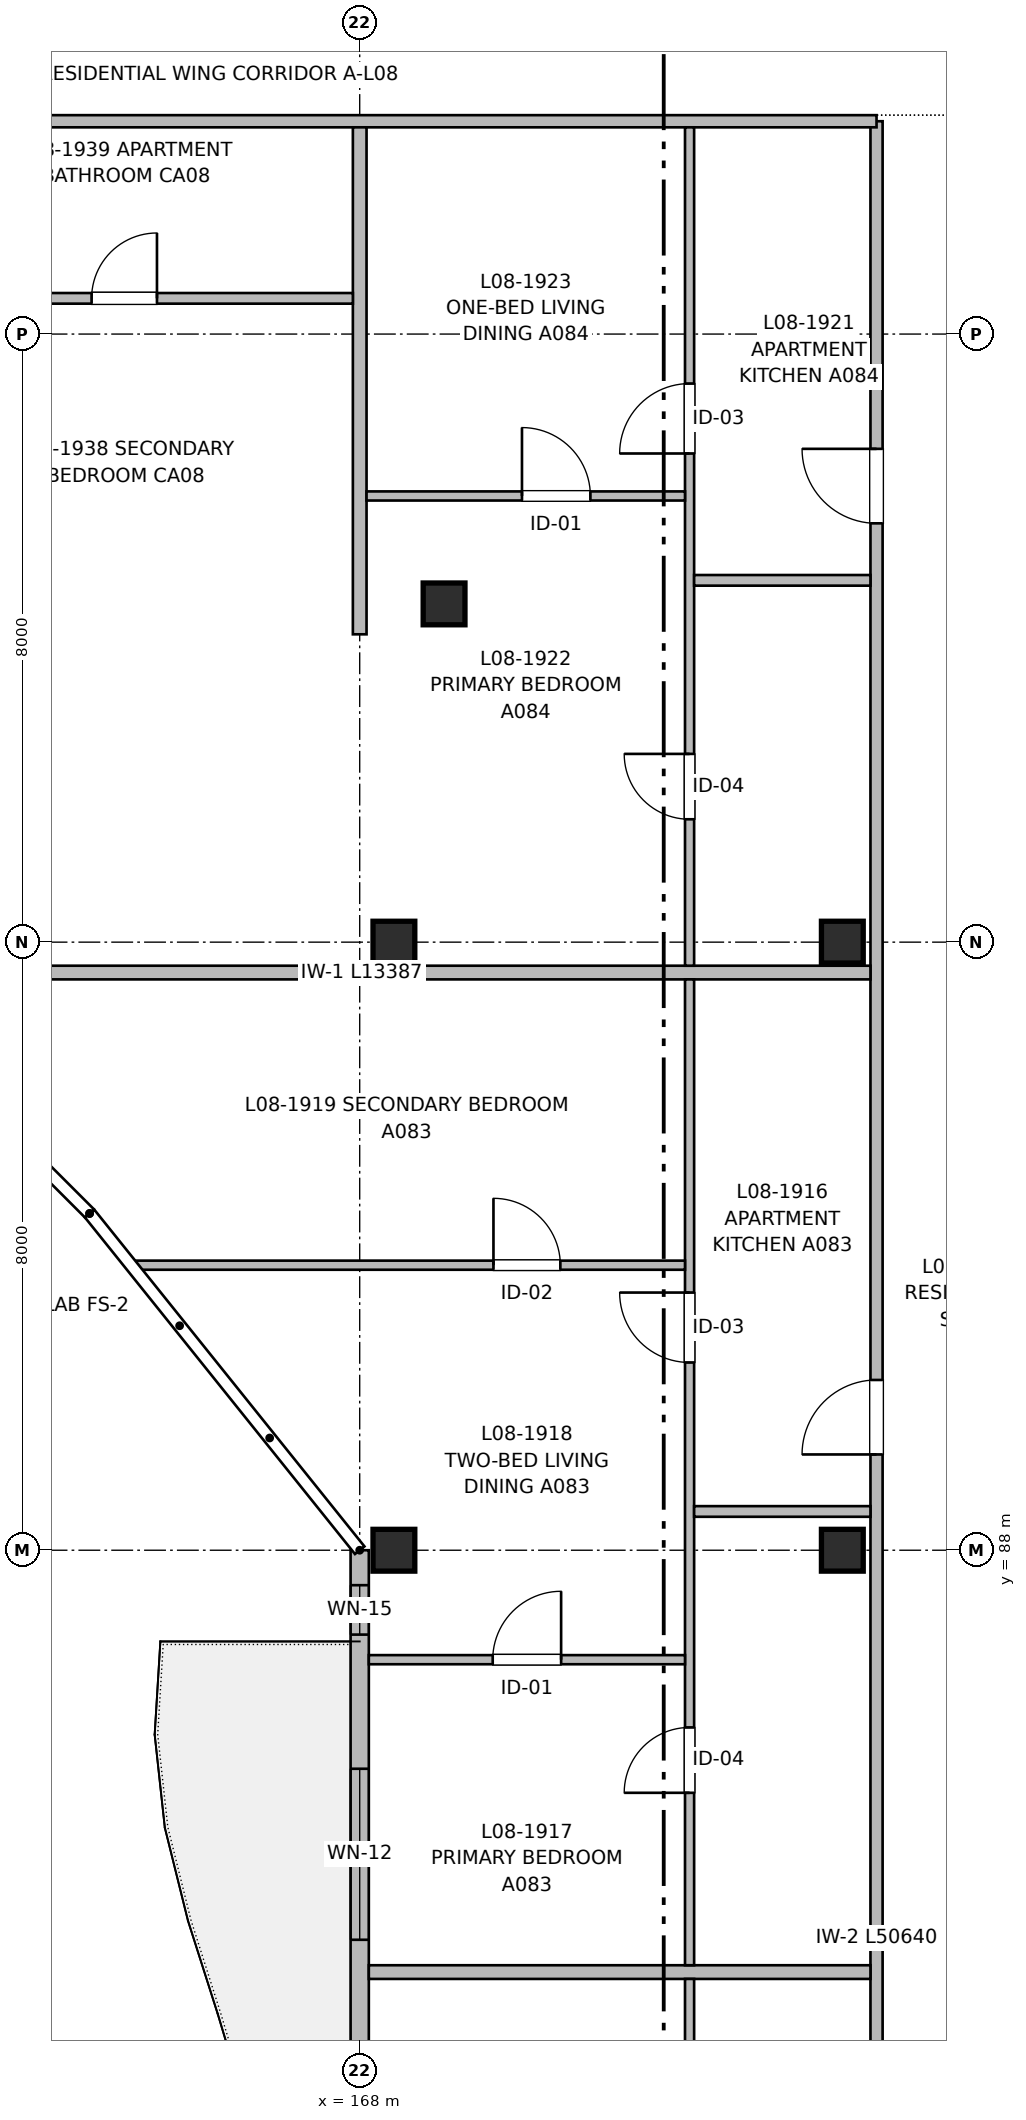
"""IFC4 building model, lengths in metres.
Left out: names, types, materials, properties, quantities, classifications, styles, units other than length and angle.
Written with IfcOpenShell. Run it as: python <this file> out.ifc"""

import sys

from ifc_helpers import new_model, si_unit, direction, frame, frame_2d, origin, origin_2d, place, context, subcontext, project, spatial, rectangle, extrude, element, fill, save


model = new_model("IFC4")
c1 = context("Model", 3, precision=1e-05, world=origin(), true_north=direction((0.0, 1.0)))
c2 = subcontext(c1, "Body", "Model", "MODEL_VIEW")
j1 = project(units=[si_unit("LENGTHUNIT", "METRE"), si_unit("PLANEANGLEUNIT", "RADIAN")], contexts=[c1])
p1 = place(None, origin())
s1 = spatial("IfcSite", under=j1, at=p1, CompositionType="ELEMENT")
p2 = place(p1, origin())
s2 = spatial("IfcBuilding", under=s1, at=p2, CompositionType="ELEMENT")
p3 = place(p2, frame((0.0, 0.0, 26.56)))
s3 = spatial("IfcBuildingStorey", under=s2, at=p3, CompositionType="ELEMENT", Elevation=26.56)
for number, where, z_axis, x_axis in (
    (1, (168.45, 88.0, 0.0), (0.0, 0.0, 1.0), (1.0, 0.0, 0.0)),
    (2, (168.45, 96.0, 0.0), (0.0, 0.0, 1.0), (1.0, 0.0, 0.0)),
    (3, (169.11, 100.45, 0.0), (0.0, 0.0, 1.0), (1.0, 0.0, 0.0)),
    (4, (174.35, 88.0, 0.0), (0.0, 0.0, 1.0), (1.0, 0.0, 0.0)),
    (5, (174.35, 96.0, 0.0), (0.0, 0.0, 1.0), (1.0, 0.0, 0.0)),
):
    element("IfcColumn", number, at=place(p3, frame(where, z_axis=z_axis, x_axis=x_axis)), inside=s3, PredefinedType="COLUMN", context=c2, shape_type="SweptSolid", body=[
        extrude(rectangle(XDim=0.55, YDim=0.55, at=origin_2d()), origin(), (0.0, 0.0, 1.0), 3.2),
    ])
p4 = place(p3, frame((168.0, 56.0, 0.0), z_axis=(0.0, 0.0, 1.0), x_axis=(0.0, 1.0, 0.0)))
e6 = element("IfcWall", 6, at=p4, inside=s3, PredefinedType="SOLIDWALL", context=c2, shape_type="SweptSolid", body=[
    extrude(rectangle(XDim=32.0, YDim=0.24, at=frame_2d((16.0, 0.0))), origin(), (0.0, 0.0, 1.0), 2.98),
])
p5 = place(p4, frame((3.4, 0.0, 0.0)))
e7 = element("IfcOpeningElement", 7, at=p5, cuts=e6, PredefinedType="OPENING", context=c2, shape_type="SweptSolid", body=[
    extrude(rectangle(XDim=1.2, YDim=2.2, at=frame_2d((0.6, 1.1))), frame((0.0, 0.13, 0.0), z_axis=(0.0, -1.0, 0.0), x_axis=(1.0, 0.0, 0.0)), (0.0, 0.0, 1.0), 0.26),
])
p6 = place(p4, frame((4.85, 0.0, 0.72)))
e8 = element("IfcOpeningElement", 8, at=p6, cuts=e6, PredefinedType="OPENING", context=c2, shape_type="SweptSolid", body=[
    extrude(rectangle(XDim=1.68, YDim=1.5, at=frame_2d((0.84, 0.75))), frame((0.0, 0.13, 0.0), z_axis=(0.0, -1.0, 0.0), x_axis=(1.0, 0.0, 0.0)), (0.0, 0.0, 1.0), 0.26),
])
p7 = place(p4, frame((10.5, 0.0, 0.82)))
e9 = element("IfcOpeningElement", 9, at=p7, cuts=e6, PredefinedType="OPENING", context=c2, shape_type="SweptSolid", body=[
    extrude(rectangle(XDim=1.3, YDim=1.4, at=frame_2d((0.65, 0.7))), frame((0.0, 0.13, 0.0), z_axis=(0.0, -1.0, 0.0), x_axis=(1.0, 0.0, 0.0)), (0.0, 0.0, 1.0), 0.26),
])
p8 = place(p4, frame((18.95, 0.0, 0.67)))
e10 = element("IfcOpeningElement", 10, at=p8, cuts=e6, PredefinedType="OPENING", context=c2, shape_type="SweptSolid", body=[
    extrude(rectangle(XDim=2.1, YDim=1.55, at=frame_2d((1.05, 0.775))), frame((0.0, 0.13, 0.0), z_axis=(0.0, -1.0, 0.0), x_axis=(1.0, 0.0, 0.0)), (0.0, 0.0, 1.0), 0.26),
])
p9 = place(p4, frame((26.875, 0.0, 0.72)))
e11 = element("IfcOpeningElement", 11, at=p9, cuts=e6, PredefinedType="OPENING", context=c2, shape_type="SweptSolid", body=[
    extrude(rectangle(XDim=2.25, YDim=1.5, at=frame_2d((1.125, 0.75))), frame((0.0, 0.13, 0.0), z_axis=(0.0, -1.0, 0.0), x_axis=(1.0, 0.0, 0.0)), (0.0, 0.0, 1.0), 0.26),
])
p10 = place(p4, frame((13.77, 0.0, 0.82)))
e12 = element("IfcOpeningElement", 12, at=p10, cuts=e6, PredefinedType="OPENING", context=c2, shape_type="SweptSolid", body=[
    extrude(rectangle(XDim=1.5, YDim=1.4, at=frame_2d((0.75, 0.7))), frame((0.0, 0.13, 0.0), z_axis=(0.0, -1.0, 0.0), x_axis=(1.0, 0.0, 0.0)), (0.0, 0.0, 1.0), 0.26),
])
p11 = place(p4, frame((23.61, 0.0, 0.82)))
e13 = element("IfcOpeningElement", 13, at=p11, cuts=e6, PredefinedType="OPENING", context=c2, shape_type="SweptSolid", body=[
    extrude(rectangle(XDim=1.5, YDim=1.4, at=frame_2d((0.75, 0.7))), frame((0.0, 0.13, 0.0), z_axis=(0.0, -1.0, 0.0), x_axis=(1.0, 0.0, 0.0)), (0.0, 0.0, 1.0), 0.26),
])
p12 = place(p4, frame((30.89, 0.0, 0.9)))
e14 = element("IfcOpeningElement", 14, at=p12, cuts=e6, PredefinedType="OPENING", context=c2, shape_type="SweptSolid", body=[
    extrude(rectangle(XDim=0.65, YDim=0.95, at=frame_2d((0.325, 0.475))), frame((0.0, 0.13, 0.0), z_axis=(0.0, -1.0, 0.0), x_axis=(1.0, 0.0, 0.0)), (0.0, 0.0, 1.0), 0.26),
])
p13 = place(p3, frame((174.8, 56.16, 0.0), z_axis=(0.0, 0.0, 1.0), x_axis=(0.0, 1.0, 0.0)))
e15 = element("IfcWall", 15, at=p13, inside=s3, PredefinedType="PARTITIONING", context=c2, shape_type="SweptSolid", body=[
    extrude(rectangle(XDim=50.64, YDim=0.16, at=frame_2d((25.32, 0.0))), origin(), (0.0, 0.0, 1.0), 2.935),
])
p14 = place(p13, frame((5.89, 0.0, 0.0)))
e16 = element("IfcOpeningElement", 16, at=p14, cuts=e15, PredefinedType="OPENING", context=c2, shape_type="SweptSolid", body=[
    extrude(rectangle(XDim=0.98, YDim=2.15, at=frame_2d((0.49, 1.075))), frame((0.0, 0.09, 0.0), z_axis=(0.0, -1.0, 0.0), x_axis=(1.0, 0.0, 0.0)), (0.0, 0.0, 1.0), 0.18),
])
p15 = place(p13, frame((19.4, 0.0, 0.0)))
e17 = element("IfcOpeningElement", 17, at=p15, cuts=e15, PredefinedType="OPENING", context=c2, shape_type="SweptSolid", body=[
    extrude(rectangle(XDim=0.98, YDim=2.15, at=frame_2d((0.49, 1.075))), frame((0.0, 0.09, 0.0), z_axis=(0.0, -1.0, 0.0), x_axis=(1.0, 0.0, 0.0)), (0.0, 0.0, 1.0), 0.18),
])
p16 = place(p13, frame((33.1, 0.0, 0.0)))
e18 = element("IfcOpeningElement", 18, at=p16, cuts=e15, PredefinedType="OPENING", context=c2, shape_type="SweptSolid", body=[
    extrude(rectangle(XDim=0.98, YDim=2.15, at=frame_2d((0.49, 1.075))), frame((0.0, 0.09, 0.0), z_axis=(0.0, -1.0, 0.0), x_axis=(1.0, 0.0, 0.0)), (0.0, 0.0, 1.0), 0.18),
])
p17 = place(p13, frame((45.35, 0.0, 0.0)))
e19 = element("IfcOpeningElement", 19, at=p17, cuts=e15, PredefinedType="OPENING", context=c2, shape_type="SweptSolid", body=[
    extrude(rectangle(XDim=0.98, YDim=2.15, at=frame_2d((0.49, 1.075))), frame((0.0, 0.09, 0.0), z_axis=(0.0, -1.0, 0.0), x_axis=(1.0, 0.0, 0.0)), (0.0, 0.0, 1.0), 0.18),
])
p18 = place(p3, frame((147.16, 106.8, 0.0), z_axis=(0.0, 0.0, 1.0), x_axis=(1.0, 0.0, 0.0)))
e20 = element("IfcWall", 20, at=p18, inside=s3, PredefinedType="PARTITIONING", context=c2, shape_type="SweptSolid", body=[
    extrude(rectangle(XDim=27.64, YDim=0.16, at=frame_2d((13.82, 0.0))), origin(), (0.0, 0.0, 1.0), 2.935),
])
p19 = place(p18, frame((3.515, 0.0, 0.0)))
e21 = element("IfcOpeningElement", 21, at=p19, cuts=e20, PredefinedType="OPENING", context=c2, shape_type="SweptSolid", body=[
    extrude(rectangle(XDim=1.05, YDim=2.15, at=frame_2d((0.525, 1.075))), frame((0.0, 0.09, 0.0), z_axis=(0.0, -1.0, 0.0), x_axis=(1.0, 0.0, 0.0)), (0.0, 0.0, 1.0), 0.18),
])
p20 = place(p18, frame((10.69, 0.0, 0.0)))
e22 = element("IfcOpeningElement", 22, at=p20, cuts=e20, PredefinedType="OPENING", context=c2, shape_type="SweptSolid", body=[
    extrude(rectangle(XDim=0.98, YDim=2.15, at=frame_2d((0.49, 1.075))), frame((0.0, 0.09, 0.0), z_axis=(0.0, -1.0, 0.0), x_axis=(1.0, 0.0, 0.0)), (0.0, 0.0, 1.0), 0.18),
])
p21 = place(p3, frame((168.0, 100.05, 0.0), z_axis=(0.0, 0.0, 1.0), x_axis=(0.0, 1.0, 0.0)))
e23 = element("IfcWall", 23, at=p21, inside=s3, PredefinedType="PARTITIONING", context=c2, shape_type="SweptSolid", body=[
    extrude(rectangle(XDim=6.67, YDim=0.18, at=frame_2d((3.335, 0.0))), origin(), (0.0, 0.0, 1.0), 2.935),
])
p22 = place(p3, frame((168.12, 82.45, 0.0), z_axis=(0.0, 0.0, 1.0), x_axis=(1.0, 0.0, 0.0)))
e24 = element("IfcWall", 24, at=p22, inside=s3, PredefinedType="PARTITIONING", context=c2, shape_type="SweptSolid", body=[
    extrude(rectangle(XDim=6.6, YDim=0.18, at=frame_2d((3.3, 0.0))), origin(), (0.0, 0.0, 1.0), 2.935),
])
p23 = place(p3, frame((161.333, 95.6, 0.0), z_axis=(0.0, 0.0, 1.0), x_axis=(1.0, 0.0, 0.0)))
e25 = element("IfcWall", 25, at=p23, inside=s3, PredefinedType="PARTITIONING", context=c2, shape_type="SweptSolid", body=[
    extrude(rectangle(XDim=13.387, YDim=0.18, at=frame_2d((6.694, 0.0))), origin(), (0.0, 0.0, 1.0), 2.935),
])
p24 = place(p3, frame((172.34, 68.38, 0.0), z_axis=(0.0, 0.0, 1.0), x_axis=(0.0, 1.0, 0.0)))
e26 = element("IfcWall", 26, at=p24, inside=s3, PredefinedType="PARTITIONING", context=c2, shape_type="SweptSolid", body=[
    extrude(rectangle(XDim=13.98, YDim=0.12, at=frame_2d((6.99, 0.0))), origin(), (0.0, 0.0, 1.0), 2.935),
])
p25 = place(p24, frame((2.443, 0.0, 0.0)))
e27 = element("IfcOpeningElement", 27, at=p25, cuts=e26, PredefinedType="OPENING", context=c2, shape_type="SweptSolid", body=[
    extrude(rectangle(XDim=0.86, YDim=2.1, at=frame_2d((0.43, 1.05))), frame((0.0, 0.07, 0.0), z_axis=(0.0, -1.0, 0.0), x_axis=(1.0, 0.0, 0.0)), (0.0, 0.0, 1.0), 0.14),
])
p26 = place(p24, frame((8.544, 0.0, 0.0)))
e28 = element("IfcOpeningElement", 28, at=p26, cuts=e26, PredefinedType="OPENING", context=c2, shape_type="SweptSolid", body=[
    extrude(rectangle(XDim=0.92, YDim=2.1, at=frame_2d((0.46, 1.05))), frame((0.0, 0.07, 0.0), z_axis=(0.0, -1.0, 0.0), x_axis=(1.0, 0.0, 0.0)), (0.0, 0.0, 1.0), 0.14),
])
p27 = place(p3, frame((172.34, 82.54, 0.0), z_axis=(0.0, 0.0, 1.0), x_axis=(0.0, 1.0, 0.0)))
e29 = element("IfcWall", 29, at=p27, inside=s3, PredefinedType="PARTITIONING", context=c2, shape_type="SweptSolid", body=[
    extrude(rectangle(XDim=12.97, YDim=0.12, at=frame_2d((6.485, 0.0))), origin(), (0.0, 0.0, 1.0), 2.935),
])
p28 = place(p27, frame((2.269, 0.0, 0.0)))
e30 = element("IfcOpeningElement", 30, at=p28, cuts=e29, PredefinedType="OPENING", context=c2, shape_type="SweptSolid", body=[
    extrude(rectangle(XDim=0.86, YDim=2.1, at=frame_2d((0.43, 1.05))), frame((0.0, 0.07, 0.0), z_axis=(0.0, -1.0, 0.0), x_axis=(1.0, 0.0, 0.0)), (0.0, 0.0, 1.0), 0.14),
])
p29 = place(p27, frame((7.93, 0.0, 0.0)))
e31 = element("IfcOpeningElement", 31, at=p29, cuts=e29, PredefinedType="OPENING", context=c2, shape_type="SweptSolid", body=[
    extrude(rectangle(XDim=0.92, YDim=2.1, at=frame_2d((0.46, 1.05))), frame((0.0, 0.07, 0.0), z_axis=(0.0, -1.0, 0.0), x_axis=(1.0, 0.0, 0.0)), (0.0, 0.0, 1.0), 0.14),
])
p30 = place(p3, frame((172.4, 88.51, 0.0), z_axis=(0.0, 0.0, 1.0), x_axis=(1.0, 0.0, 0.0)))
e32 = element("IfcWall", 32, at=p30, inside=s3, PredefinedType="PARTITIONING", context=c2, shape_type="SweptSolid", body=[
    extrude(rectangle(XDim=2.32, YDim=0.14, at=frame_2d((1.16, 0.0))), origin(), (0.0, 0.0, 1.0), 2.935),
])
p31 = place(p3, frame((168.12, 86.56, 0.0), z_axis=(0.0, 0.0, 1.0), x_axis=(1.0, 0.0, 0.0)))
e33 = element("IfcWall", 33, at=p31, inside=s3, PredefinedType="PARTITIONING", context=c2, shape_type="SweptSolid", body=[
    extrude(rectangle(XDim=4.16, YDim=0.12, at=frame_2d((2.08, 0.0))), origin(), (0.0, 0.0, 1.0), 2.935),
])
p32 = place(p31, frame((1.63, 0.0, 0.0)))
e34 = element("IfcOpeningElement", 34, at=p32, cuts=e33, PredefinedType="OPENING", context=c2, shape_type="SweptSolid", body=[
    extrude(rectangle(XDim=0.9, YDim=2.1, at=frame_2d((0.45, 1.05))), frame((0.0, 0.07, 0.0), z_axis=(0.0, -1.0, 0.0), x_axis=(1.0, 0.0, 0.0)), (0.0, 0.0, 1.0), 0.14),
])
p33 = place(p3, frame((165.043, 91.75, 0.0), z_axis=(0.0, 0.0, 1.0), x_axis=(1.0, 0.0, 0.0)))
e35 = element("IfcWall", 35, at=p33, inside=s3, PredefinedType="PARTITIONING", context=c2, shape_type="SweptSolid", body=[
    extrude(rectangle(XDim=7.237, YDim=0.12, at=frame_2d((3.619, 0.0))), origin(), (0.0, 0.0, 1.0), 2.935),
])
p34 = place(p33, frame((4.717, 0.0, 0.0)))
e36 = element("IfcOpeningElement", 36, at=p34, cuts=e35, PredefinedType="OPENING", context=c2, shape_type="SweptSolid", body=[
    extrude(rectangle(XDim=0.88, YDim=2.1, at=frame_2d((0.44, 1.05))), frame((0.0, 0.07, 0.0), z_axis=(0.0, -1.0, 0.0), x_axis=(1.0, 0.0, 0.0)), (0.0, 0.0, 1.0), 0.14),
])
p35 = place(p3, frame((172.34, 95.69, 0.0), z_axis=(0.0, 0.0, 1.0), x_axis=(0.0, 1.0, 0.0)))
e37 = element("IfcWall", 37, at=p35, inside=s3, PredefinedType="PARTITIONING", context=c2, shape_type="SweptSolid", body=[
    extrude(rectangle(XDim=11.03, YDim=0.12, at=frame_2d((5.515, 0.0))), origin(), (0.0, 0.0, 1.0), 2.935),
])
p36 = place(p35, frame((1.927, 0.0, 0.0)))
e38 = element("IfcOpeningElement", 38, at=p36, cuts=e37, PredefinedType="OPENING", context=c2, shape_type="SweptSolid", body=[
    extrude(rectangle(XDim=0.86, YDim=2.1, at=frame_2d((0.43, 1.05))), frame((0.0, 0.07, 0.0), z_axis=(0.0, -1.0, 0.0), x_axis=(1.0, 0.0, 0.0)), (0.0, 0.0, 1.0), 0.14),
])
p37 = place(p35, frame((6.739, 0.0, 0.0)))
e39 = element("IfcOpeningElement", 39, at=p37, cuts=e37, PredefinedType="OPENING", context=c2, shape_type="SweptSolid", body=[
    extrude(rectangle(XDim=0.92, YDim=2.1, at=frame_2d((0.46, 1.05))), frame((0.0, 0.07, 0.0), z_axis=(0.0, -1.0, 0.0), x_axis=(1.0, 0.0, 0.0)), (0.0, 0.0, 1.0), 0.14),
])
p38 = place(p3, frame((172.4, 100.76, 0.0), z_axis=(0.0, 0.0, 1.0), x_axis=(1.0, 0.0, 0.0)))
e40 = element("IfcWall", 40, at=p38, inside=s3, PredefinedType="PARTITIONING", context=c2, shape_type="SweptSolid", body=[
    extrude(rectangle(XDim=2.32, YDim=0.14, at=frame_2d((1.16, 0.0))), origin(), (0.0, 0.0, 1.0), 2.935),
])
p39 = place(p3, frame((168.09, 101.87, 0.0), z_axis=(0.0, 0.0, 1.0), x_axis=(1.0, 0.0, 0.0)))
e41 = element("IfcWall", 41, at=p39, inside=s3, PredefinedType="PARTITIONING", context=c2, shape_type="SweptSolid", body=[
    extrude(rectangle(XDim=4.19, YDim=0.12, at=frame_2d((2.095, 0.0))), origin(), (0.0, 0.0, 1.0), 2.935),
])
p40 = place(p39, frame((2.045, 0.0, 0.0)))
e42 = element("IfcOpeningElement", 42, at=p40, cuts=e41, PredefinedType="OPENING", context=c2, shape_type="SweptSolid", body=[
    extrude(rectangle(XDim=0.9, YDim=2.1, at=frame_2d((0.45, 1.05))), frame((0.0, 0.07, 0.0), z_axis=(0.0, -1.0, 0.0), x_axis=(1.0, 0.0, 0.0)), (0.0, 0.0, 1.0), 0.14),
])
p41 = place(p3, frame((161.94, 104.47, 0.0), z_axis=(0.0, 0.0, 1.0), x_axis=(1.0, 0.0, 0.0)))
e43 = element("IfcWall", 43, at=p41, inside=s3, PredefinedType="PARTITIONING", context=c2, shape_type="SweptSolid", body=[
    extrude(rectangle(XDim=5.97, YDim=0.14, at=frame_2d((2.985, 0.0))), origin(), (0.0, 0.0, 1.0), 2.935),
])
p42 = place(p41, frame((2.533, 0.0, 0.0)))
e44 = element("IfcOpeningElement", 44, at=p42, cuts=e43, PredefinedType="OPENING", context=c2, shape_type="SweptSolid", body=[
    extrude(rectangle(XDim=0.86, YDim=2.1, at=frame_2d((0.43, 1.05))), frame((0.0, 0.08, 0.0), z_axis=(0.0, -1.0, 0.0), x_axis=(1.0, 0.0, 0.0)), (0.0, 0.0, 1.0), 0.16),
])
p43 = place(p9, origin())
e45 = element("IfcWindow", 45, at=p43, inside=s3, PartitioningType="SINGLE_PANEL", PredefinedType="WINDOW", context=c2, shape_type="SweptSolid", body=[
    extrude(rectangle(XDim=2.25, YDim=1.5, at=frame_2d((1.125, 0.75))), frame((0.0, 0.03, 0.0), z_axis=(0.0, -1.0, 0.0), x_axis=(1.0, 0.0, 0.0)), (0.0, 0.0, 1.0), 0.06),
])
fill(e11, e45)
p44 = place(p28, origin())
e46 = element("IfcDoor", 46, at=p44, inside=s3, OperationType="SINGLE_SWING_LEFT", PredefinedType="DOOR", context=c2, shape_type="SweptSolid", body=[
    extrude(rectangle(XDim=0.86, YDim=2.1, at=frame_2d((0.43, 1.05))), frame((0.0, 0.025, 0.0), z_axis=(0.0, -1.0, 0.0), x_axis=(1.0, 0.0, 0.0)), (0.0, 0.0, 1.0), 0.05),
])
fill(e30, e46)
p45 = place(p29, origin())
e47 = element("IfcDoor", 47, at=p45, inside=s3, OperationType="SINGLE_SWING_RIGHT", PredefinedType="DOOR", context=c2, shape_type="SweptSolid", body=[
    extrude(rectangle(XDim=0.92, YDim=2.1, at=frame_2d((0.46, 1.05))), frame((0.0, 0.025, 0.0), z_axis=(0.0, -1.0, 0.0), x_axis=(1.0, 0.0, 0.0)), (0.0, 0.0, 1.0), 0.05),
])
fill(e31, e47)
p46 = place(p16, origin())
e48 = element("IfcDoor", 48, at=p46, inside=s3, OperationType="SINGLE_SWING_LEFT", PredefinedType="DOOR", context=c2, shape_type="SweptSolid", body=[
    extrude(rectangle(XDim=0.98, YDim=2.15, at=frame_2d((0.49, 1.075))), frame((0.0, 0.025, 0.0), z_axis=(0.0, -1.0, 0.0), x_axis=(1.0, 0.0, 0.0)), (0.0, 0.0, 1.0), 0.05),
])
fill(e18, e48)
p47 = place(p32, origin())
e49 = element("IfcDoor", 49, at=p47, inside=s3, OperationType="SINGLE_SWING_RIGHT", PredefinedType="DOOR", context=c2, shape_type="SweptSolid", body=[
    extrude(rectangle(XDim=0.9, YDim=2.1, at=frame_2d((0.45, 1.05))), frame((0.0, 0.025, 0.0), z_axis=(0.0, -1.0, 0.0), x_axis=(1.0, 0.0, 0.0)), (0.0, 0.0, 1.0), 0.05),
])
fill(e34, e49)
p48 = place(p34, origin())
e50 = element("IfcDoor", 50, at=p48, inside=s3, OperationType="SINGLE_SWING_LEFT", PredefinedType="DOOR", context=c2, shape_type="SweptSolid", body=[
    extrude(rectangle(XDim=0.88, YDim=2.1, at=frame_2d((0.44, 1.05))), frame((0.0, 0.025, 0.0), z_axis=(0.0, -1.0, 0.0), x_axis=(1.0, 0.0, 0.0)), (0.0, 0.0, 1.0), 0.05),
])
fill(e36, e50)
p49 = place(p36, origin())
e51 = element("IfcDoor", 51, at=p49, inside=s3, OperationType="SINGLE_SWING_RIGHT", PredefinedType="DOOR", context=c2, shape_type="SweptSolid", body=[
    extrude(rectangle(XDim=0.86, YDim=2.1, at=frame_2d((0.43, 1.05))), frame((0.0, 0.025, 0.0), z_axis=(0.0, -1.0, 0.0), x_axis=(1.0, 0.0, 0.0)), (0.0, 0.0, 1.0), 0.05),
])
fill(e38, e51)
p50 = place(p37, origin())
e52 = element("IfcDoor", 52, at=p50, inside=s3, OperationType="SINGLE_SWING_LEFT", PredefinedType="DOOR", context=c2, shape_type="SweptSolid", body=[
    extrude(rectangle(XDim=0.92, YDim=2.1, at=frame_2d((0.46, 1.05))), frame((0.0, 0.025, 0.0), z_axis=(0.0, -1.0, 0.0), x_axis=(1.0, 0.0, 0.0)), (0.0, 0.0, 1.0), 0.05),
])
fill(e39, e52)
p51 = place(p17, origin())
e53 = element("IfcDoor", 53, at=p51, inside=s3, OperationType="SINGLE_SWING_RIGHT", PredefinedType="DOOR", context=c2, shape_type="SweptSolid", body=[
    extrude(rectangle(XDim=0.98, YDim=2.15, at=frame_2d((0.49, 1.075))), frame((0.0, 0.025, 0.0), z_axis=(0.0, -1.0, 0.0), x_axis=(1.0, 0.0, 0.0)), (0.0, 0.0, 1.0), 0.05),
])
fill(e19, e53)
p52 = place(p40, origin())
e54 = element("IfcDoor", 54, at=p52, inside=s3, OperationType="SINGLE_SWING_LEFT", PredefinedType="DOOR", context=c2, shape_type="SweptSolid", body=[
    extrude(rectangle(XDim=0.9, YDim=2.1, at=frame_2d((0.45, 1.05))), frame((0.0, 0.025, 0.0), z_axis=(0.0, -1.0, 0.0), x_axis=(1.0, 0.0, 0.0)), (0.0, 0.0, 1.0), 0.05),
])
fill(e42, e54)
p53 = place(p42, origin())
e55 = element("IfcDoor", 55, at=p53, inside=s3, OperationType="SINGLE_SWING_RIGHT", PredefinedType="DOOR", context=c2, shape_type="SweptSolid", body=[
    extrude(rectangle(XDim=0.86, YDim=2.1, at=frame_2d((0.43, 1.05))), frame((0.0, 0.025, 0.0), z_axis=(0.0, -1.0, 0.0), x_axis=(1.0, 0.0, 0.0)), (0.0, 0.0, 1.0), 0.05),
])
fill(e44, e55)
p54 = place(p12, origin())
e56 = element("IfcWindow", 56, at=p54, inside=s3, PartitioningType="SINGLE_PANEL", PredefinedType="WINDOW", context=c2, shape_type="SweptSolid", body=[
    extrude(rectangle(XDim=0.65, YDim=0.95, at=frame_2d((0.325, 0.475))), frame((0.0, 0.03, 0.0), z_axis=(0.0, -1.0, 0.0), x_axis=(1.0, 0.0, 0.0)), (0.0, 0.0, 1.0), 0.06),
])
fill(e14, e56)
save(model, sys.argv[1])
